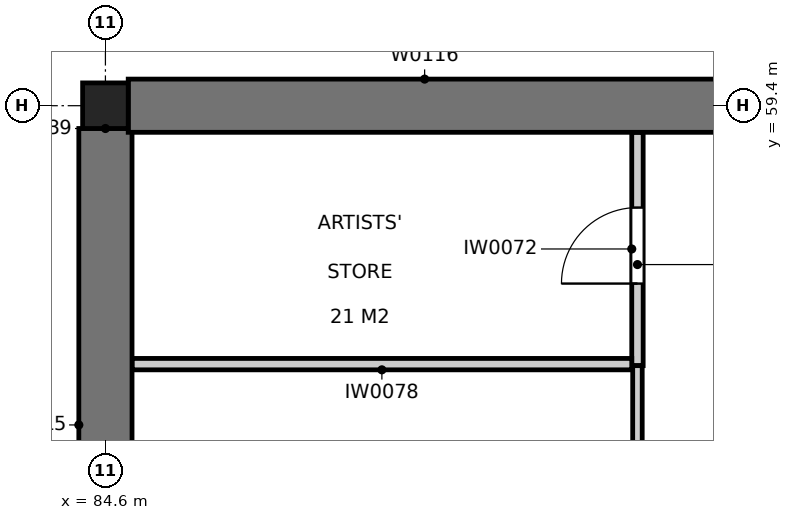
"""IFC4 building model, lengths in metres.
Left out: names, types, materials, properties, quantities, classifications, styles, units other than length and angle.
Written with IfcOpenShell. Run it as: python <this file> out.ifc"""

import sys

from ifc_helpers import new_model, si_unit, direction, frame, frame_2d, origin, origin_2d, place, context, subcontext, project, spatial, rectangle, extrude, element, fill, save


model = new_model("IFC4")
c1 = context("Model", 3, precision=1e-05, world=origin(), true_north=direction((0.0, 1.0)))
c2 = subcontext(c1, "Body", "Model", "MODEL_VIEW")
j1 = project(units=[si_unit("LENGTHUNIT", "METRE"), si_unit("PLANEANGLEUNIT", "RADIAN")], contexts=[c1])
p1 = place(None, origin())
s1 = spatial("IfcSite", under=j1, at=p1, CompositionType="ELEMENT")
p2 = place(p1, origin())
s2 = spatial("IfcBuilding", under=s1, at=p2, CompositionType="ELEMENT")
p3 = place(p2, frame((0.0, 0.0, -5.0)))
s3 = spatial("IfcBuildingStorey", under=s2, at=p3, CompositionType="ELEMENT", Elevation=-5.0)
p4 = place(p3, frame((84.6, 59.4, -0.5), z_axis=(0.0, 0.0, 1.0), x_axis=(1.0, 0.0, 0.0)))
e1 = element("IfcColumn", 1, at=p4, inside=s3, PredefinedType="COLUMN", context=c2, shape_type="SweptSolid", body=[
    extrude(rectangle(XDim=0.6, YDim=0.6, at=origin_2d()), origin(), (0.0, 0.0, 1.0), 5.5),
])
for number, where, z_axis, x_axis in (
    (2, (84.6, 51.3, 0.0), (0.0, 0.0, 1.0), (0.0, 1.0, 0.0)),
    (3, (84.9, 59.4, 0.0), (0.0, 0.0, 1.0), (1.0, 0.0, 0.0)),
):
    element("IfcWall", number, at=place(p3, frame(where, z_axis=z_axis, x_axis=x_axis)), inside=s3, PredefinedType="SOLIDWALL", context=c2, shape_type="SweptSolid", body=[
        extrude(rectangle(XDim=7.8, YDim=0.7, at=frame_2d((3.9, 0.0))), origin(), (0.0, 0.0, 1.0), 5.0),
    ])
p5 = place(p3, frame((91.6, 55.98, 0.0), z_axis=(0.0, 0.0, 1.0), x_axis=(0.0, 1.0, 0.0)))
e4 = element("IfcWall", 4, at=p5, inside=s3, PredefinedType="PARTITIONING", context=c2, shape_type="SweptSolid", body=[
    extrude(rectangle(XDim=3.07, YDim=0.15, at=frame_2d((1.535, 0.0))), origin(), (0.0, 0.0, 1.0), 4.14),
])
p6 = place(p5, frame((1.08, 0.0, 0.0)))
e5 = element("IfcOpeningElement", 5, at=p6, cuts=e4, PredefinedType="OPENING", context=c2, shape_type="SweptSolid", body=[
    extrude(rectangle(XDim=1.0, YDim=2.1, at=frame_2d((0.5, 1.05))), frame((0.0, 0.085, 0.0), z_axis=(0.0, -1.0, 0.0), x_axis=(1.0, 0.0, 0.0)), (0.0, 0.0, 1.0), 0.17),
])
p7 = place(p3, frame((91.599, 44.066, 0.0), z_axis=(0.0, 0.0, 1.0), x_axis=(8.1970572e-05, 0.99999999664, 0.0)))
e6 = element("IfcWall", 6, at=p7, inside=s3, PredefinedType="PARTITIONING", context=c2, shape_type="SweptSolid", body=[
    extrude(rectangle(XDim=11.914, YDim=0.125, at=frame_2d((5.957, 0.0))), origin(), (0.0, 0.0, 1.0), 4.04),
])
p8 = place(p7, frame((2.124, 0.0, 0.0)))
e7 = element("IfcOpeningElement", 7, at=p8, cuts=e6, PredefinedType="OPENING", context=c2, shape_type="SweptSolid", body=[
    extrude(rectangle(XDim=0.9, YDim=2.1, at=frame_2d((0.45, 1.05))), frame((0.0, 0.073, 0.0), z_axis=(0.0, -1.0, 0.0), x_axis=(1.0, 0.0, 0.0)), (0.0, 0.0, 1.0), 0.145),
])
p9 = place(p3, frame((91.525, 56.0, 0.0), z_axis=(0.0, 0.0, 1.0), x_axis=(-1.0, 0.0, 0.0)))
e8 = element("IfcWall", 8, at=p9, inside=s3, PredefinedType="PARTITIONING", context=c2, shape_type="SweptSolid", body=[
    extrude(rectangle(XDim=6.575, YDim=0.15, at=frame_2d((3.288, 0.0))), origin(), (0.0, 0.0, 1.0), 4.84),
])
p10 = place(p6, origin())
e9 = element("IfcDoor", 9, at=p10, inside=s3, OperationType="SINGLE_SWING_LEFT", PredefinedType="DOOR", context=c2, shape_type="SweptSolid", body=[
    extrude(rectangle(XDim=1.0, YDim=2.1, at=frame_2d((0.5, 1.05))), frame((0.0, 0.025, 0.0), z_axis=(0.0, -1.0, 0.0), x_axis=(1.0, 0.0, 0.0)), (0.0, 0.0, 1.0), 0.05),
])
fill(e5, e9)
save(model, sys.argv[1])
